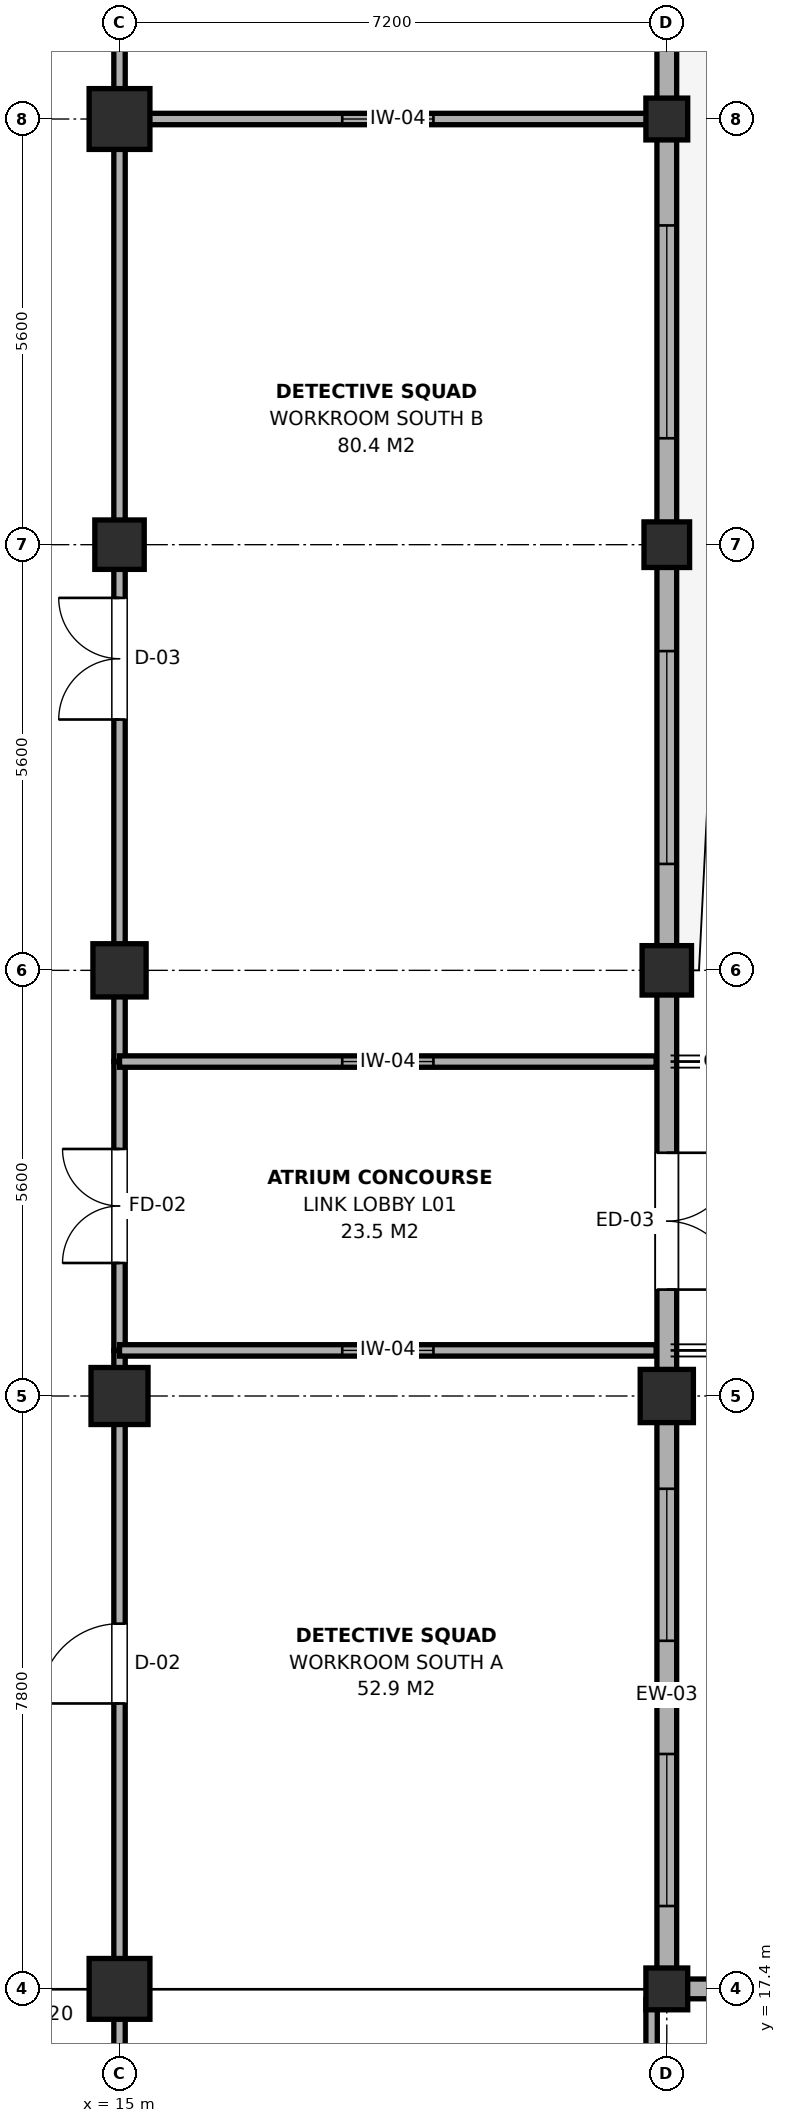
"""IFC4 building model, lengths in metres.
Left out: names, types, materials, properties, quantities, classifications, styles, units other than length and angle.
Written with IfcOpenShell. Run it as: python <this file> out.ifc"""

import sys

from ifc_helpers import new_model, si_unit, direction, frame, frame_2d, origin, origin_2d, place, context, subcontext, project, spatial, rectangle, extrude, element, fill, save


model = new_model("IFC4")
c1 = context("Model", 3, precision=1e-05, world=origin(), true_north=direction((0.0, 1.0)))
c2 = subcontext(c1, "Body", "Model", "MODEL_VIEW")
j1 = project(units=[si_unit("LENGTHUNIT", "METRE"), si_unit("PLANEANGLEUNIT", "RADIAN")], contexts=[c1])
p1 = place(None, origin())
s1 = spatial("IfcSite", under=j1, at=p1, CompositionType="ELEMENT")
p2 = place(p1, origin())
s2 = spatial("IfcBuilding", under=s1, at=p2, CompositionType="ELEMENT")
p3 = place(p2, frame((0.0, 0.0, 4.8)))
s3 = spatial("IfcBuildingStorey", under=s2, at=p3, CompositionType="ELEMENT", Elevation=4.8)
p4 = place(p3, frame((15.0, 17.4, 0.0), z_axis=(0.0, 0.0, 1.0), x_axis=(1.0, 0.0, 0.0)))
e1 = element("IfcColumn", 1, at=p4, inside=s3, PredefinedType="COLUMN", context=c2, shape_type="SweptSolid", body=[
    extrude(rectangle(XDim=0.8, YDim=0.8, at=origin_2d()), origin(), (0.0, 0.0, 1.0), 4.2),
])
p5 = place(p3, frame((15.0, 25.2, 0.0), z_axis=(0.0, 0.0, 1.0), x_axis=(1.0, 0.0, 0.0)))
e2 = element("IfcColumn", 2, at=p5, inside=s3, PredefinedType="COLUMN", context=c2, shape_type="SweptSolid", body=[
    extrude(rectangle(XDim=0.75, YDim=0.75, at=origin_2d()), origin(), (0.0, 0.0, 1.0), 4.2),
])
p6 = place(p3, frame((15.0, 30.8, 0.0), z_axis=(0.0, 0.0, 1.0), x_axis=(1.0, 0.0, 0.0)))
e3 = element("IfcColumn", 3, at=p6, inside=s3, PredefinedType="COLUMN", context=c2, shape_type="SweptSolid", body=[
    extrude(rectangle(XDim=0.7, YDim=0.7, at=origin_2d()), origin(), (0.0, 0.0, 1.0), 4.2),
])
p7 = place(p3, frame((15.0, 36.4, 0.0), z_axis=(0.0, 0.0, 1.0), x_axis=(1.0, 0.0, 0.0)))
e4 = element("IfcColumn", 4, at=p7, inside=s3, PredefinedType="COLUMN", context=c2, shape_type="SweptSolid", body=[
    extrude(rectangle(XDim=0.65, YDim=0.65, at=origin_2d()), origin(), (0.0, 0.0, 1.0), 4.2),
])
p8 = place(p3, frame((15.0, 42.0, 0.0), z_axis=(0.0, 0.0, 1.0), x_axis=(1.0, 0.0, 0.0)))
e5 = element("IfcColumn", 5, at=p8, inside=s3, PredefinedType="COLUMN", context=c2, shape_type="SweptSolid", body=[
    extrude(rectangle(XDim=0.8, YDim=0.8, at=origin_2d()), origin(), (0.0, 0.0, 1.0), 4.2),
])
p9 = place(p3, frame((22.2, 17.4, 0.0), z_axis=(0.0, 0.0, 1.0), x_axis=(1.0, 0.0, 0.0)))
e6 = element("IfcColumn", 6, at=p9, inside=s3, PredefinedType="COLUMN", context=c2, shape_type="SweptSolid", body=[
    extrude(rectangle(XDim=0.55, YDim=0.55, at=origin_2d()), origin(), (0.0, 0.0, 1.0), 4.2),
])
p10 = place(p3, frame((22.2, 25.2, 0.0), z_axis=(0.0, 0.0, 1.0), x_axis=(1.0, 0.0, 0.0)))
e7 = element("IfcColumn", 7, at=p10, inside=s3, PredefinedType="COLUMN", context=c2, shape_type="SweptSolid", body=[
    extrude(rectangle(XDim=0.7, YDim=0.7, at=origin_2d()), origin(), (0.0, 0.0, 1.0), 4.2),
])
p11 = place(p3, frame((22.2, 30.8, 0.0), z_axis=(0.0, 0.0, 1.0), x_axis=(1.0, 0.0, 0.0)))
e8 = element("IfcColumn", 8, at=p11, inside=s3, PredefinedType="COLUMN", context=c2, shape_type="SweptSolid", body=[
    extrude(rectangle(XDim=0.65, YDim=0.65, at=origin_2d()), origin(), (0.0, 0.0, 1.0), 4.2),
])
p12 = place(p3, frame((22.2, 36.4, 0.0), z_axis=(0.0, 0.0, 1.0), x_axis=(1.0, 0.0, 0.0)))
e9 = element("IfcColumn", 9, at=p12, inside=s3, PredefinedType="COLUMN", context=c2, shape_type="SweptSolid", body=[
    extrude(rectangle(XDim=0.6, YDim=0.6, at=origin_2d()), origin(), (0.0, 0.0, 1.0), 4.2),
])
p13 = place(p3, frame((22.2, 42.0, 0.0), z_axis=(0.0, 0.0, 1.0), x_axis=(1.0, 0.0, 0.0)))
e10 = element("IfcColumn", 10, at=p13, inside=s3, PredefinedType="COLUMN", context=c2, shape_type="SweptSolid", body=[
    extrude(rectangle(XDim=0.55, YDim=0.55, at=origin_2d()), origin(), (0.0, 0.0, 1.0), 4.2),
])
p14 = place(p3, frame((22.07, 17.4, 0.0), z_axis=(0.0, 0.0, 1.0), x_axis=(1.0, 0.0, 0.0)))
e11 = element("IfcWall", 11, at=p14, inside=s3, PredefinedType="SOLIDWALL", context=c2, shape_type="SweptSolid", body=[
    extrude(rectangle(XDim=4.33, YDim=0.26, at=frame_2d((2.165, 0.0))), origin(), (0.0, 0.0, 1.0), 3.375),
])
p15 = place(p14, frame((0.965, 0.0, 0.9)))
e12 = element("IfcOpeningElement", 12, at=p15, cuts=e11, PredefinedType="OPENING", context=c2, shape_type="SweptSolid", body=[
    extrude(rectangle(XDim=2.4, YDim=2.1, at=frame_2d((1.2, 1.05))), frame((0.0, 0.145, 0.0), z_axis=(0.0, -1.0, 0.0), x_axis=(1.0, 0.0, 0.0)), (0.0, 0.0, 1.0), 0.29),
])
p16 = place(p3, frame((22.2, 17.27, 0.0), z_axis=(0.0, 0.0, 1.0), x_axis=(0.0, 1.0, 0.0)))
e13 = element("IfcWall", 13, at=p16, inside=s3, PredefinedType="SOLIDWALL", context=c2, shape_type="SweptSolid", body=[
    extrude(rectangle(XDim=7.93, YDim=0.26, at=frame_2d((3.965, 0.0))), origin(), (0.0, 0.0, 1.0), 3.375),
])
p17 = place(p16, frame((1.22, 0.0, 0.9)))
e14 = element("IfcOpeningElement", 14, at=p17, cuts=e13, PredefinedType="OPENING", context=c2, shape_type="SweptSolid", body=[
    extrude(rectangle(XDim=2.0, YDim=1.8, at=frame_2d((1.0, 0.9))), frame((0.0, 0.145, 0.0), z_axis=(0.0, -1.0, 0.0), x_axis=(1.0, 0.0, 0.0)), (0.0, 0.0, 1.0), 0.29),
])
p18 = place(p16, frame((4.71, 0.0, 0.9)))
e15 = element("IfcOpeningElement", 15, at=p18, cuts=e13, PredefinedType="OPENING", context=c2, shape_type="SweptSolid", body=[
    extrude(rectangle(XDim=2.0, YDim=1.8, at=frame_2d((1.0, 0.9))), frame((0.0, 0.145, 0.0), z_axis=(0.0, -1.0, 0.0), x_axis=(1.0, 0.0, 0.0)), (0.0, 0.0, 1.0), 0.29),
])
p19 = place(p3, frame((22.2, 25.2, 0.0), z_axis=(0.0, 0.0, 1.0), x_axis=(0.0, 1.0, 0.0)))
e16 = element("IfcWall", 16, at=p19, inside=s3, PredefinedType="SOLIDWALL", context=c2, shape_type="SweptSolid", body=[
    extrude(rectangle(XDim=5.6, YDim=0.26, at=frame_2d((2.8, 0.0))), origin(), (0.0, 0.0, 1.0), 3.425),
])
p20 = place(p19, frame((1.4, 0.0, 0.0)))
e17 = element("IfcOpeningElement", 17, at=p20, cuts=e16, PredefinedType="OPENING", context=c2, shape_type="SweptSolid", body=[
    extrude(rectangle(XDim=1.8, YDim=2.2, at=frame_2d((0.9, 1.1))), frame((0.0, 0.145, 0.0), z_axis=(0.0, -1.0, 0.0), x_axis=(1.0, 0.0, 0.0)), (0.0, 0.0, 1.0), 0.29),
])
p21 = place(p3, frame((22.2, 30.8, 0.0), z_axis=(0.0, 0.0, 1.0), x_axis=(0.0, 1.0, 0.0)))
e18 = element("IfcWall", 18, at=p21, inside=s3, PredefinedType="SOLIDWALL", context=c2, shape_type="SweptSolid", body=[
    extrude(rectangle(XDim=5.6, YDim=0.26, at=frame_2d((2.8, 0.0))), origin(), (0.0, 0.0, 1.0), 3.475),
])
p22 = place(p21, frame((1.4, 0.0, 0.9)))
e19 = element("IfcOpeningElement", 19, at=p22, cuts=e18, PredefinedType="OPENING", context=c2, shape_type="SweptSolid", body=[
    extrude(rectangle(XDim=2.8, YDim=2.2, at=frame_2d((1.4, 1.1))), frame((0.0, 0.145, 0.0), z_axis=(0.0, -1.0, 0.0), x_axis=(1.0, 0.0, 0.0)), (0.0, 0.0, 1.0), 0.29),
])
p23 = place(p3, frame((22.2, 36.4, 0.0), z_axis=(0.0, 0.0, 1.0), x_axis=(0.0, 1.0, 0.0)))
e20 = element("IfcWall", 20, at=p23, inside=s3, PredefinedType="SOLIDWALL", context=c2, shape_type="SweptSolid", body=[
    extrude(rectangle(XDim=5.6, YDim=0.26, at=frame_2d((2.8, 0.0))), origin(), (0.0, 0.0, 1.0), 3.525),
])
p24 = place(p23, frame((1.4, 0.0, 0.9)))
e21 = element("IfcOpeningElement", 21, at=p24, cuts=e20, PredefinedType="OPENING", context=c2, shape_type="SweptSolid", body=[
    extrude(rectangle(XDim=2.8, YDim=2.2, at=frame_2d((1.4, 1.1))), frame((0.0, 0.145, 0.0), z_axis=(0.0, -1.0, 0.0), x_axis=(1.0, 0.0, 0.0)), (0.0, 0.0, 1.0), 0.29),
])
p25 = place(p3, frame((22.2, 42.0, 0.0), z_axis=(0.0, 0.0, 1.0), x_axis=(0.0, 1.0, 0.0)))
e22 = element("IfcWall", 22, at=p25, inside=s3, PredefinedType="SOLIDWALL", context=c2, shape_type="SweptSolid", body=[
    extrude(rectangle(XDim=5.6, YDim=0.26, at=frame_2d((2.8, 0.0))), origin(), (0.0, 0.0, 1.0), 3.625),
])
p26 = place(p25, frame((1.4, 0.0, 0.9)))
e23 = element("IfcOpeningElement", 23, at=p26, cuts=e22, PredefinedType="OPENING", context=c2, shape_type="SweptSolid", body=[
    extrude(rectangle(XDim=2.8, YDim=2.2, at=frame_2d((1.4, 1.1))), frame((0.0, 0.145, 0.0), z_axis=(0.0, -1.0, 0.0), x_axis=(1.0, 0.0, 0.0)), (0.0, 0.0, 1.0), 0.29),
])
p27 = place(p3, frame((15.0, 12.0, 0.0), z_axis=(0.0, 0.0, 1.0), x_axis=(0.0, 1.0, 0.0)))
e24 = element("IfcWall", 24, at=p27, inside=s3, PredefinedType="PARTITIONING", context=c2, shape_type="SweptSolid", body=[
    extrude(rectangle(XDim=5.26, YDim=0.15, at=frame_2d((2.63, 0.0))), origin(), (0.0, 0.0, 1.0), 3.475),
])
p28 = place(p27, frame((2.03, 0.0, 0.95)))
e25 = element("IfcOpeningElement", 25, at=p28, cuts=e24, PredefinedType="OPENING", context=c2, shape_type="SweptSolid", body=[
    extrude(rectangle(XDim=1.2, YDim=1.5, at=frame_2d((0.6, 0.75))), frame((0.0, 0.09, 0.0), z_axis=(0.0, -1.0, 0.0), x_axis=(1.0, 0.0, 0.0)), (0.0, 0.0, 1.0), 0.18),
])
p29 = place(p3, frame((22.0, 12.0, 0.0), z_axis=(0.0, 0.0, 1.0), x_axis=(0.0, 1.0, 0.0)))
e26 = element("IfcWall", 26, at=p29, inside=s3, PredefinedType="PARTITIONING", context=c2, shape_type="SweptSolid", body=[
    extrude(rectangle(XDim=5.26, YDim=0.15, at=frame_2d((2.63, 0.0))), origin(), (0.0, 0.0, 1.0), 3.375),
])
p30 = place(p29, frame((2.03, 0.0, 0.95)))
e27 = element("IfcOpeningElement", 27, at=p30, cuts=e26, PredefinedType="OPENING", context=c2, shape_type="SweptSolid", body=[
    extrude(rectangle(XDim=1.2, YDim=1.5, at=frame_2d((0.6, 0.75))), frame((0.0, 0.09, 0.0), z_axis=(0.0, -1.0, 0.0), x_axis=(1.0, 0.0, 0.0)), (0.0, 0.0, 1.0), 0.18),
])
p31 = place(p3, frame((15.0, 17.56, 0.0), z_axis=(0.0, 0.0, 1.0), x_axis=(0.0, 1.0, 0.0)))
e28 = element("IfcWall", 28, at=p31, inside=s3, PredefinedType="PARTITIONING", context=c2, shape_type="SweptSolid", body=[
    extrude(rectangle(XDim=8.24, YDim=0.15, at=frame_2d((4.12, 0.0))), origin(), (0.0, 0.0, 1.0), 3.375),
])
p32 = place(p31, frame((3.595, 0.0, 0.0)))
e29 = element("IfcOpeningElement", 29, at=p32, cuts=e28, PredefinedType="OPENING", context=c2, shape_type="SweptSolid", body=[
    extrude(rectangle(XDim=1.05, YDim=2.15, at=frame_2d((0.525, 1.075))), frame((0.0, 0.09, 0.0), z_axis=(0.0, -1.0, 0.0), x_axis=(1.0, 0.0, 0.0)), (0.0, 0.0, 1.0), 0.18),
])
p33 = place(p3, frame((15.0, 25.8, 0.0), z_axis=(0.0, 0.0, 1.0), x_axis=(0.0, 1.0, 0.0)))
e30 = element("IfcWall", 30, at=p33, inside=s3, PredefinedType="PARTITIONING", context=c2, shape_type="SweptSolid", body=[
    extrude(rectangle(XDim=3.8, YDim=0.15, at=frame_2d((1.9, 0.0))), origin(), (0.0, 0.0, 1.0), 3.425),
])
p34 = place(p33, frame((1.15, 0.0, 0.0)))
e31 = element("IfcOpeningElement", 31, at=p34, cuts=e30, PredefinedType="OPENING", context=c2, shape_type="SweptSolid", body=[
    extrude(rectangle(XDim=1.5, YDim=2.15, at=frame_2d((0.75, 1.075))), frame((0.0, 0.09, 0.0), z_axis=(0.0, -1.0, 0.0), x_axis=(1.0, 0.0, 0.0)), (0.0, 0.0, 1.0), 0.18),
])
p35 = place(p3, frame((15.0, 25.8, 0.0), z_axis=(0.0, 0.0, 1.0), x_axis=(1.0, 0.0, 0.0)))
e32 = element("IfcWall", 32, at=p35, inside=s3, PredefinedType="PARTITIONING", context=c2, shape_type="SweptSolid", body=[
    extrude(rectangle(XDim=7.06, YDim=0.15, at=frame_2d((3.53, 0.0))), origin(), (0.0, 0.0, 1.0), 3.425),
])
p36 = place(p35, frame((2.93, 0.0, 0.95)))
e33 = element("IfcOpeningElement", 33, at=p36, cuts=e32, PredefinedType="OPENING", context=c2, shape_type="SweptSolid", body=[
    extrude(rectangle(XDim=1.2, YDim=1.5, at=frame_2d((0.6, 0.75))), frame((0.0, 0.09, 0.0), z_axis=(0.0, -1.0, 0.0), x_axis=(1.0, 0.0, 0.0)), (0.0, 0.0, 1.0), 0.18),
])
p37 = place(p3, frame((15.0, 29.6, 0.0), z_axis=(0.0, 0.0, 1.0), x_axis=(0.0, 1.0, 0.0)))
e34 = element("IfcWall", 34, at=p37, inside=s3, PredefinedType="PARTITIONING", context=c2, shape_type="SweptSolid", body=[
    extrude(rectangle(XDim=12.4, YDim=0.15, at=frame_2d((6.2, 0.0))), origin(), (0.0, 0.0, 1.0), 3.425),
])
p38 = place(p37, frame((4.5, 0.0, 0.0)))
e35 = element("IfcOpeningElement", 35, at=p38, cuts=e34, PredefinedType="OPENING", context=c2, shape_type="SweptSolid", body=[
    extrude(rectangle(XDim=1.6, YDim=2.15, at=frame_2d((0.8, 1.075))), frame((0.0, 0.09, 0.0), z_axis=(0.0, -1.0, 0.0), x_axis=(1.0, 0.0, 0.0)), (0.0, 0.0, 1.0), 0.18),
])
p39 = place(p3, frame((15.0, 29.6, 0.0), z_axis=(0.0, 0.0, 1.0), x_axis=(1.0, 0.0, 0.0)))
e36 = element("IfcWall", 36, at=p39, inside=s3, PredefinedType="PARTITIONING", context=c2, shape_type="SweptSolid", body=[
    extrude(rectangle(XDim=7.06, YDim=0.15, at=frame_2d((3.53, 0.0))), origin(), (0.0, 0.0, 1.0), 3.425),
])
p40 = place(p39, frame((2.93, 0.0, 0.95)))
e37 = element("IfcOpeningElement", 37, at=p40, cuts=e36, PredefinedType="OPENING", context=c2, shape_type="SweptSolid", body=[
    extrude(rectangle(XDim=1.2, YDim=1.5, at=frame_2d((0.6, 0.75))), frame((0.0, 0.09, 0.0), z_axis=(0.0, -1.0, 0.0), x_axis=(1.0, 0.0, 0.0)), (0.0, 0.0, 1.0), 0.18),
])
p41 = place(p3, frame((15.0, 42.0, 0.0), z_axis=(0.0, 0.0, 1.0), x_axis=(0.0, 1.0, 0.0)))
e38 = element("IfcWall", 38, at=p41, inside=s3, PredefinedType="PARTITIONING", context=c2, shape_type="SweptSolid", body=[
    extrude(rectangle(XDim=24.6, YDim=0.15, at=frame_2d((12.3, 0.0))), origin(), (0.0, 0.0, 1.0), 3.375),
])
p42 = place(p41, frame((11.95, 0.0, 0.0)))
e39 = element("IfcOpeningElement", 39, at=p42, cuts=e38, PredefinedType="OPENING", context=c2, shape_type="SweptSolid", body=[
    extrude(rectangle(XDim=1.6, YDim=2.15, at=frame_2d((0.8, 1.075))), frame((0.0, 0.09, 0.0), z_axis=(0.0, -1.0, 0.0), x_axis=(1.0, 0.0, 0.0)), (0.0, 0.0, 1.0), 0.18),
])
p43 = place(p3, frame((15.0, 42.0, 0.0), z_axis=(0.0, 0.0, 1.0), x_axis=(1.0, 0.0, 0.0)))
e40 = element("IfcWall", 40, at=p43, inside=s3, PredefinedType="PARTITIONING", context=c2, shape_type="SweptSolid", body=[
    extrude(rectangle(XDim=7.06, YDim=0.15, at=frame_2d((3.53, 0.0))), origin(), (0.0, 0.0, 1.0), 3.645),
])
p44 = place(p43, frame((2.93, 0.0, 0.95)))
e41 = element("IfcOpeningElement", 41, at=p44, cuts=e40, PredefinedType="OPENING", context=c2, shape_type="SweptSolid", body=[
    extrude(rectangle(XDim=1.2, YDim=1.5, at=frame_2d((0.6, 0.75))), frame((0.0, 0.09, 0.0), z_axis=(0.0, -1.0, 0.0), x_axis=(1.0, 0.0, 0.0)), (0.0, 0.0, 1.0), 0.18),
])
p45 = place(p17, origin())
e42 = element("IfcWindow", 42, at=p45, inside=s3, PartitioningType="SINGLE_PANEL", PredefinedType="WINDOW", context=c2, shape_type="SweptSolid", body=[
    extrude(rectangle(XDim=2.0, YDim=1.8, at=frame_2d((1.0, 0.9))), frame((0.0, 0.03, 0.0), z_axis=(0.0, -1.0, 0.0), x_axis=(1.0, 0.0, 0.0)), (0.0, 0.0, 1.0), 0.06),
])
fill(e14, e42)
p46 = place(p18, origin())
e43 = element("IfcWindow", 43, at=p46, inside=s3, PartitioningType="SINGLE_PANEL", PredefinedType="WINDOW", context=c2, shape_type="SweptSolid", body=[
    extrude(rectangle(XDim=2.0, YDim=1.8, at=frame_2d((1.0, 0.9))), frame((0.0, 0.03, 0.0), z_axis=(0.0, -1.0, 0.0), x_axis=(1.0, 0.0, 0.0)), (0.0, 0.0, 1.0), 0.06),
])
fill(e15, e43)
p47 = place(p20, frame((1.8, 0.0, 0.0), z_axis=(0.0, 0.0, 1.0), x_axis=(-1.0, 0.0, 0.0)))
e44 = element("IfcDoor", 44, at=p47, inside=s3, OperationType="DOUBLE_DOOR_SINGLE_SWING", PredefinedType="DOOR", context=c2, shape_type="SweptSolid", body=[
    extrude(rectangle(XDim=1.8, YDim=2.2, at=frame_2d((0.9, 1.1))), frame((0.0, 0.025, 0.0), z_axis=(0.0, -1.0, 0.0), x_axis=(1.0, 0.0, 0.0)), (0.0, 0.0, 1.0), 0.05),
])
fill(e17, e44)
p48 = place(p22, origin())
e45 = element("IfcWindow", 45, at=p48, inside=s3, PartitioningType="SINGLE_PANEL", PredefinedType="WINDOW", context=c2, shape_type="SweptSolid", body=[
    extrude(rectangle(XDim=2.8, YDim=2.2, at=frame_2d((1.4, 1.1))), frame((0.0, 0.03, 0.0), z_axis=(0.0, -1.0, 0.0), x_axis=(1.0, 0.0, 0.0)), (0.0, 0.0, 1.0), 0.06),
])
fill(e19, e45)
p49 = place(p24, origin())
e46 = element("IfcWindow", 46, at=p49, inside=s3, PartitioningType="SINGLE_PANEL", PredefinedType="WINDOW", context=c2, shape_type="SweptSolid", body=[
    extrude(rectangle(XDim=2.8, YDim=2.2, at=frame_2d((1.4, 1.1))), frame((0.0, 0.03, 0.0), z_axis=(0.0, -1.0, 0.0), x_axis=(1.0, 0.0, 0.0)), (0.0, 0.0, 1.0), 0.06),
])
fill(e21, e46)
p50 = place(p32, origin())
e47 = element("IfcDoor", 47, at=p50, inside=s3, OperationType="SINGLE_SWING_LEFT", PredefinedType="DOOR", context=c2, shape_type="SweptSolid", body=[
    extrude(rectangle(XDim=1.05, YDim=2.15, at=frame_2d((0.525, 1.075))), frame((0.0, 0.025, 0.0), z_axis=(0.0, -1.0, 0.0), x_axis=(1.0, 0.0, 0.0)), (0.0, 0.0, 1.0), 0.05),
])
fill(e29, e47)
p51 = place(p34, origin())
e48 = element("IfcDoor", 48, at=p51, inside=s3, OperationType="DOUBLE_DOOR_SINGLE_SWING", PredefinedType="DOOR", context=c2, shape_type="SweptSolid", body=[
    extrude(rectangle(XDim=1.5, YDim=2.15, at=frame_2d((0.75, 1.075))), frame((0.0, 0.025, 0.0), z_axis=(0.0, -1.0, 0.0), x_axis=(1.0, 0.0, 0.0)), (0.0, 0.0, 1.0), 0.05),
])
fill(e31, e48)
p52 = place(p36, origin())
e49 = element("IfcWindow", 49, at=p52, inside=s3, PartitioningType="SINGLE_PANEL", PredefinedType="WINDOW", context=c2, shape_type="SweptSolid", body=[
    extrude(rectangle(XDim=1.2, YDim=1.5, at=frame_2d((0.6, 0.75))), frame((0.0, 0.03, 0.0), z_axis=(0.0, -1.0, 0.0), x_axis=(1.0, 0.0, 0.0)), (0.0, 0.0, 1.0), 0.06),
])
fill(e33, e49)
p53 = place(p38, origin())
e50 = element("IfcDoor", 50, at=p53, inside=s3, OperationType="DOUBLE_DOOR_SINGLE_SWING", PredefinedType="DOOR", context=c2, shape_type="SweptSolid", body=[
    extrude(rectangle(XDim=1.6, YDim=2.15, at=frame_2d((0.8, 1.075))), frame((0.0, 0.025, 0.0), z_axis=(0.0, -1.0, 0.0), x_axis=(1.0, 0.0, 0.0)), (0.0, 0.0, 1.0), 0.05),
])
fill(e35, e50)
p54 = place(p40, origin())
e51 = element("IfcWindow", 51, at=p54, inside=s3, PartitioningType="SINGLE_PANEL", PredefinedType="WINDOW", context=c2, shape_type="SweptSolid", body=[
    extrude(rectangle(XDim=1.2, YDim=1.5, at=frame_2d((0.6, 0.75))), frame((0.0, 0.03, 0.0), z_axis=(0.0, -1.0, 0.0), x_axis=(1.0, 0.0, 0.0)), (0.0, 0.0, 1.0), 0.06),
])
fill(e37, e51)
p55 = place(p44, origin())
e52 = element("IfcWindow", 52, at=p55, inside=s3, PartitioningType="SINGLE_PANEL", PredefinedType="WINDOW", context=c2, shape_type="SweptSolid", body=[
    extrude(rectangle(XDim=1.2, YDim=1.5, at=frame_2d((0.6, 0.75))), frame((0.0, 0.03, 0.0), z_axis=(0.0, -1.0, 0.0), x_axis=(1.0, 0.0, 0.0)), (0.0, 0.0, 1.0), 0.06),
])
fill(e41, e52)
save(model, sys.argv[1])
